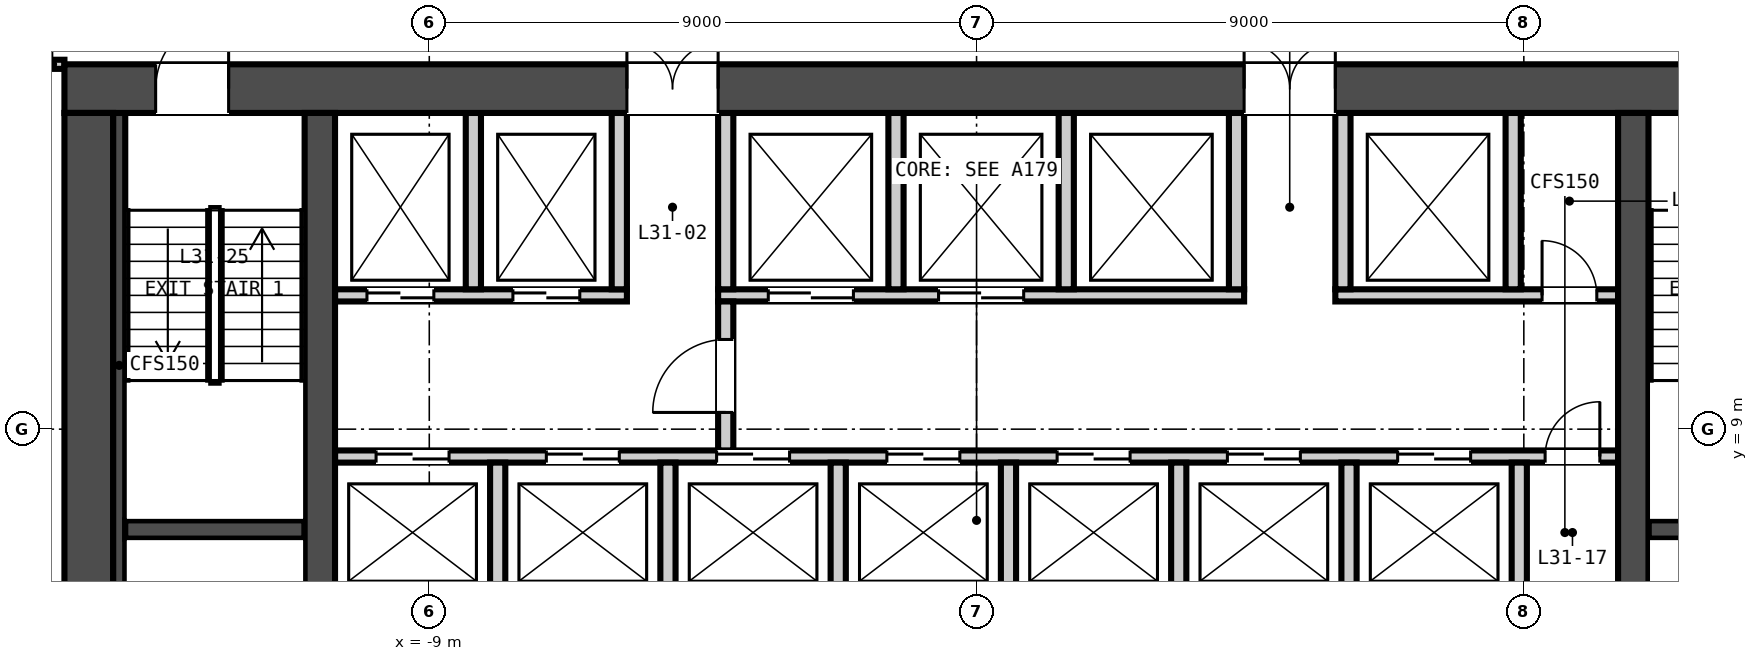
"""IFC4 building model, lengths in metres.
Left out: names, types, materials, properties, quantities, classifications, styles, units other than length and angle.
Written with IfcOpenShell. Run it as: python <this file> out.ifc"""

import sys

from ifc_helpers import new_model, si_unit, direction, frame, frame_2d, origin, place, context, subcontext, project, spatial, rectangle, extrude, element, fill, save


model = new_model("IFC4")
c1 = context("Model", 3, precision=1e-05, world=origin(), true_north=direction((0.0, 1.0)))
c2 = subcontext(c1, "Body", "Model", "MODEL_VIEW")
j1 = project(units=[si_unit("LENGTHUNIT", "METRE"), si_unit("PLANEANGLEUNIT", "RADIAN")], contexts=[c1])
p1 = place(None, origin())
s1 = spatial("IfcSite", under=j1, at=p1, CompositionType="ELEMENT")
p2 = place(p1, origin())
s2 = spatial("IfcBuilding", under=s1, at=p2, CompositionType="ELEMENT")
p3 = place(p2, frame((0.0, 0.0, 129.8)))
s3 = spatial("IfcBuildingStorey", under=s2, at=p3, CompositionType="ELEMENT", Elevation=129.8)
p4 = place(p3, frame((-15.0, 14.6, -0.15), z_axis=(0.0, 0.0, 1.0), x_axis=(1.0, 0.0, 0.0)))
e1 = element("IfcWall", 1, at=p4, inside=s3, PredefinedType="SOLIDWALL", context=c2, shape_type="SweptSolid", body=[
    extrude(rectangle(XDim=30.0, YDim=0.8, at=frame_2d((15.0, 0.0))), origin(), (0.0, 0.0, 1.0), 3.65),
])
p5 = place(p4, frame((9.25, 0.0, 0.15)))
e2 = element("IfcOpeningElement", 2, at=p5, cuts=e1, PredefinedType="OPENING", context=c2, shape_type="SweptSolid", body=[
    extrude(rectangle(XDim=1.5, YDim=2.1, at=frame_2d((0.75, 1.05))), frame((0.0, 0.41, 0.0), z_axis=(0.0, -1.0, 0.0), x_axis=(1.0, 0.0, 0.0)), (0.0, 0.0, 1.0), 0.82),
])
p6 = place(p4, frame((19.4, 0.0, 0.15)))
e3 = element("IfcOpeningElement", 3, at=p6, cuts=e1, PredefinedType="OPENING", context=c2, shape_type="SweptSolid", body=[
    extrude(rectangle(XDim=1.5, YDim=2.1, at=frame_2d((0.75, 1.05))), frame((0.0, 0.41, 0.0), z_axis=(0.0, -1.0, 0.0), x_axis=(1.0, 0.0, 0.0)), (0.0, 0.0, 1.0), 0.82),
])
p7 = place(p4, frame((1.5, 0.0, 0.15)))
e4 = element("IfcOpeningElement", 4, at=p7, cuts=e1, PredefinedType="OPENING", context=c2, shape_type="SweptSolid", body=[
    extrude(rectangle(XDim=1.2, YDim=2.1, at=frame_2d((0.6, 1.05))), frame((0.0, 0.41, 0.0), z_axis=(0.0, -1.0, 0.0), x_axis=(1.0, 0.0, 0.0)), (0.0, 0.0, 1.0), 0.82),
])
p8 = place(p4, frame((27.3, 0.0, 0.15)))
e5 = element("IfcOpeningElement", 5, at=p8, cuts=e1, PredefinedType="OPENING", context=c2, shape_type="SweptSolid", body=[
    extrude(rectangle(XDim=1.2, YDim=2.1, at=frame_2d((0.6, 1.05))), frame((0.0, 0.41, 0.0), z_axis=(0.0, -1.0, 0.0), x_axis=(1.0, 0.0, 0.0)), (0.0, 0.0, 1.0), 0.82),
])
p9 = place(p3, frame((-14.6, 0.8, -0.15), z_axis=(0.0, 0.0, 1.0), x_axis=(0.0, 1.0, 0.0)))
e6 = element("IfcWall", 6, at=p9, inside=s3, PredefinedType="SOLIDWALL", context=c2, shape_type="SweptSolid", body=[
    extrude(rectangle(XDim=13.4, YDim=0.8, at=frame_2d((6.7, 0.0))), origin(), (0.0, 0.0, 1.0), 3.65),
])
for number, where, z_axis, x_axis in (
    (7, (-10.8, 0.8, -0.15), (0.0, 0.0, 1.0), (0.0, 1.0, 0.0)),
    (8, (10.8, 0.8, -0.15), (0.0, 0.0, 1.0), (0.0, 1.0, 0.0)),
):
    element("IfcWall", number, at=place(p3, frame(where, z_axis=z_axis, x_axis=x_axis)), inside=s3, PredefinedType="SOLIDWALL", context=c2, shape_type="SweptSolid", body=[
        extrude(rectangle(XDim=13.4, YDim=0.5, at=frame_2d((6.7, 0.0))), origin(), (0.0, 0.0, 1.0), 3.65),
    ])
p10 = place(p3, frame((-10.55, 8.55, 0.0), z_axis=(0.0, 0.0, 1.0), x_axis=(1.0, 0.0, 0.0)))
e9 = element("IfcWall", 9, at=p10, inside=s3, PredefinedType="PARTITIONING", context=c2, shape_type="SweptSolid", body=[
    extrude(rectangle(XDim=21.1, YDim=0.2, at=frame_2d((10.55, 0.0))), origin(), (0.0, 0.0, 1.0), 3.5),
])
p11 = place(p10, frame((0.675, 0.0, 0.0)))
e10 = element("IfcOpeningElement", 10, at=p11, cuts=e9, PredefinedType="OPENING", context=c2, shape_type="SweptSolid", body=[
    extrude(rectangle(XDim=1.2, YDim=2.1, at=frame_2d((0.6, 1.05))), frame((0.0, 0.11, 0.0), z_axis=(0.0, -1.0, 0.0), x_axis=(1.0, 0.0, 0.0)), (0.0, 0.0, 1.0), 0.22),
])
p12 = place(p10, frame((3.475, 0.0, 0.0)))
e11 = element("IfcOpeningElement", 11, at=p12, cuts=e9, PredefinedType="OPENING", context=c2, shape_type="SweptSolid", body=[
    extrude(rectangle(XDim=1.2, YDim=2.1, at=frame_2d((0.6, 1.05))), frame((0.0, 0.11, 0.0), z_axis=(0.0, -1.0, 0.0), x_axis=(1.0, 0.0, 0.0)), (0.0, 0.0, 1.0), 0.22),
])
p13 = place(p10, frame((6.275, 0.0, 0.0)))
e12 = element("IfcOpeningElement", 12, at=p13, cuts=e9, PredefinedType="OPENING", context=c2, shape_type="SweptSolid", body=[
    extrude(rectangle(XDim=1.2, YDim=2.1, at=frame_2d((0.6, 1.05))), frame((0.0, 0.11, 0.0), z_axis=(0.0, -1.0, 0.0), x_axis=(1.0, 0.0, 0.0)), (0.0, 0.0, 1.0), 0.22),
])
p14 = place(p10, frame((9.075, 0.0, 0.0)))
e13 = element("IfcOpeningElement", 13, at=p14, cuts=e9, PredefinedType="OPENING", context=c2, shape_type="SweptSolid", body=[
    extrude(rectangle(XDim=1.2, YDim=2.1, at=frame_2d((0.6, 1.05))), frame((0.0, 0.11, 0.0), z_axis=(0.0, -1.0, 0.0), x_axis=(1.0, 0.0, 0.0)), (0.0, 0.0, 1.0), 0.22),
])
p15 = place(p10, frame((11.875, 0.0, 0.0)))
e14 = element("IfcOpeningElement", 14, at=p15, cuts=e9, PredefinedType="OPENING", context=c2, shape_type="SweptSolid", body=[
    extrude(rectangle(XDim=1.2, YDim=2.1, at=frame_2d((0.6, 1.05))), frame((0.0, 0.11, 0.0), z_axis=(0.0, -1.0, 0.0), x_axis=(1.0, 0.0, 0.0)), (0.0, 0.0, 1.0), 0.22),
])
p16 = place(p10, frame((14.675, 0.0, 0.0)))
e15 = element("IfcOpeningElement", 15, at=p16, cuts=e9, PredefinedType="OPENING", context=c2, shape_type="SweptSolid", body=[
    extrude(rectangle(XDim=1.2, YDim=2.1, at=frame_2d((0.6, 1.05))), frame((0.0, 0.11, 0.0), z_axis=(0.0, -1.0, 0.0), x_axis=(1.0, 0.0, 0.0)), (0.0, 0.0, 1.0), 0.22),
])
p17 = place(p10, frame((17.475, 0.0, 0.0)))
e16 = element("IfcOpeningElement", 16, at=p17, cuts=e9, PredefinedType="OPENING", context=c2, shape_type="SweptSolid", body=[
    extrude(rectangle(XDim=1.2, YDim=2.1, at=frame_2d((0.6, 1.05))), frame((0.0, 0.11, 0.0), z_axis=(0.0, -1.0, 0.0), x_axis=(1.0, 0.0, 0.0)), (0.0, 0.0, 1.0), 0.22),
])
p18 = place(p10, frame((19.9, 0.0, 0.0)))
e17 = element("IfcOpeningElement", 17, at=p18, cuts=e9, PredefinedType="OPENING", context=c2, shape_type="SweptSolid", body=[
    extrude(rectangle(XDim=0.9, YDim=2.1, at=frame_2d((0.45, 1.05))), frame((0.0, 0.11, 0.0), z_axis=(0.0, -1.0, 0.0), x_axis=(1.0, 0.0, 0.0)), (0.0, 0.0, 1.0), 0.22),
])
p19 = place(p3, frame((-10.55, 11.2, 0.0), z_axis=(0.0, 0.0, 1.0), x_axis=(1.0, 0.0, 0.0)))
e18 = element("IfcWall", 18, at=p19, inside=s3, PredefinedType="PARTITIONING", context=c2, shape_type="SweptSolid", body=[
    extrude(rectangle(XDim=4.8, YDim=0.2, at=frame_2d((2.4, 0.0))), origin(), (0.0, 0.0, 1.0), 3.5),
])
p20 = place(p19, frame((0.525, 0.0, 0.0)))
e19 = element("IfcOpeningElement", 19, at=p20, cuts=e18, PredefinedType="OPENING", context=c2, shape_type="SweptSolid", body=[
    extrude(rectangle(XDim=1.1, YDim=2.1, at=frame_2d((0.55, 1.05))), frame((0.0, 0.11, 0.0), z_axis=(0.0, -1.0, 0.0), x_axis=(1.0, 0.0, 0.0)), (0.0, 0.0, 1.0), 0.22),
])
p21 = place(p19, frame((2.925, 0.0, 0.0)))
e20 = element("IfcOpeningElement", 20, at=p21, cuts=e18, PredefinedType="OPENING", context=c2, shape_type="SweptSolid", body=[
    extrude(rectangle(XDim=1.1, YDim=2.1, at=frame_2d((0.55, 1.05))), frame((0.0, 0.11, 0.0), z_axis=(0.0, -1.0, 0.0), x_axis=(1.0, 0.0, 0.0)), (0.0, 0.0, 1.0), 0.22),
])
p22 = place(p3, frame((-4.25, 11.2, 0.0), z_axis=(0.0, 0.0, 1.0), x_axis=(1.0, 0.0, 0.0)))
e21 = element("IfcWall", 21, at=p22, inside=s3, PredefinedType="PARTITIONING", context=c2, shape_type="SweptSolid", body=[
    extrude(rectangle(XDim=8.65, YDim=0.2, at=frame_2d((4.325, 0.0))), origin(), (0.0, 0.0, 1.0), 3.5),
])
p23 = place(p22, frame((0.825, 0.0, 0.0)))
e22 = element("IfcOpeningElement", 22, at=p23, cuts=e21, PredefinedType="OPENING", context=c2, shape_type="SweptSolid", body=[
    extrude(rectangle(XDim=1.4, YDim=2.1, at=frame_2d((0.7, 1.05))), frame((0.0, 0.11, 0.0), z_axis=(0.0, -1.0, 0.0), x_axis=(1.0, 0.0, 0.0)), (0.0, 0.0, 1.0), 0.22),
])
p24 = place(p22, frame((3.625, 0.0, 0.0)))
e23 = element("IfcOpeningElement", 23, at=p24, cuts=e21, PredefinedType="OPENING", context=c2, shape_type="SweptSolid", body=[
    extrude(rectangle(XDim=1.4, YDim=2.1, at=frame_2d((0.7, 1.05))), frame((0.0, 0.11, 0.0), z_axis=(0.0, -1.0, 0.0), x_axis=(1.0, 0.0, 0.0)), (0.0, 0.0, 1.0), 0.22),
])
p25 = place(p3, frame((5.9, 11.2, 0.0), z_axis=(0.0, 0.0, 1.0), x_axis=(1.0, 0.0, 0.0)))
e24 = element("IfcWall", 24, at=p25, inside=s3, PredefinedType="PARTITIONING", context=c2, shape_type="SweptSolid", body=[
    extrude(rectangle(XDim=4.65, YDim=0.2, at=frame_2d((2.325, 0.0))), origin(), (0.0, 0.0, 1.0), 3.5),
])
p26 = place(p25, frame((3.4, 0.0, 0.0)))
e25 = element("IfcOpeningElement", 25, at=p26, cuts=e24, PredefinedType="OPENING", context=c2, shape_type="SweptSolid", body=[
    extrude(rectangle(XDim=0.9, YDim=2.1, at=frame_2d((0.45, 1.05))), frame((0.0, 0.11, 0.0), z_axis=(0.0, -1.0, 0.0), x_axis=(1.0, 0.0, 0.0)), (0.0, 0.0, 1.0), 0.22),
])
p27 = place(p3, frame((-4.125, 8.65, 0.0), z_axis=(0.0, 0.0, 1.0), x_axis=(0.0, 1.0, 0.0)))
e26 = element("IfcWall", 26, at=p27, inside=s3, PredefinedType="PARTITIONING", context=c2, shape_type="SweptSolid", body=[
    extrude(rectangle(XDim=2.45, YDim=0.25, at=frame_2d((1.225, 0.0))), origin(), (0.0, 0.0, 1.0), 3.5),
])
p28 = place(p27, frame((0.625, 0.0, 0.0)))
e27 = element("IfcOpeningElement", 27, at=p28, cuts=e26, PredefinedType="OPENING", context=c2, shape_type="SweptSolid", body=[
    extrude(rectangle(XDim=1.2, YDim=2.1, at=frame_2d((0.6, 1.05))), frame((0.0, 0.135, 0.0), z_axis=(0.0, -1.0, 0.0), x_axis=(1.0, 0.0, 0.0)), (0.0, 0.0, 1.0), 0.27),
])
for number, where, z_axis, x_axis in (
    (28, (-7.875, 6.15, 0.0), (0.0, 0.0, 1.0), (0.0, 1.0, 0.0)),
    (29, (-5.075, 6.15, 0.0), (0.0, 0.0, 1.0), (0.0, 1.0, 0.0)),
    (30, (-2.275, 6.15, 0.0), (0.0, 0.0, 1.0), (0.0, 1.0, 0.0)),
    (31, (0.525, 6.15, 0.0), (0.0, 0.0, 1.0), (0.0, 1.0, 0.0)),
    (32, (3.325, 6.15, 0.0), (0.0, 0.0, 1.0), (0.0, 1.0, 0.0)),
    (33, (6.125, 6.15, 0.0), (0.0, 0.0, 1.0), (0.0, 1.0, 0.0)),
    (34, (8.925, 6.15, 0.0), (0.0, 0.0, 1.0), (0.0, 1.0, 0.0)),
):
    element("IfcWall", number, at=place(p3, frame(where, z_axis=z_axis, x_axis=x_axis)), inside=s3, PredefinedType="PARTITIONING", context=c2, shape_type="SweptSolid", body=[
        extrude(rectangle(XDim=2.3, YDim=0.25, at=frame_2d((1.15, 0.0))), origin(), (0.0, 0.0, 1.0), 3.5),
    ])
for number, where, z_axis, x_axis in (
    (35, (-8.275, 11.3, 0.0), (0.0, 0.0, 1.0), (0.0, 1.0, 0.0)),
    (36, (-5.875, 11.3, 0.0), (0.0, 0.0, 1.0), (0.0, 1.0, 0.0)),
    (37, (-4.125, 11.3, 0.0), (0.0, 0.0, 1.0), (0.0, 1.0, 0.0)),
    (38, (-1.325, 11.3, 0.0), (0.0, 0.0, 1.0), (0.0, 1.0, 0.0)),
    (39, (1.475, 11.3, 0.0), (0.0, 0.0, 1.0), (0.0, 1.0, 0.0)),
    (40, (4.275, 11.3, 0.0), (0.0, 0.0, 1.0), (0.0, 1.0, 0.0)),
    (41, (6.025, 11.3, 0.0), (0.0, 0.0, 1.0), (0.0, 1.0, 0.0)),
    (42, (8.825, 11.3, 0.0), (0.0, 0.0, 1.0), (0.0, 1.0, 0.0)),
):
    element("IfcWall", number, at=place(p3, frame(where, z_axis=z_axis, x_axis=x_axis)), inside=s3, PredefinedType="PARTITIONING", context=c2, shape_type="SweptSolid", body=[
        extrude(rectangle(XDim=2.9, YDim=0.25, at=frame_2d((1.45, 0.0))), origin(), (0.0, 0.0, 1.0), 3.5),
    ])
p29 = place(p3, frame((-14.0, 7.35, 0.0), z_axis=(0.0, 0.0, 1.0), x_axis=(1.0, 0.0, 0.0)))
e43 = element("IfcWall", 43, at=p29, inside=s3, PredefinedType="SOLIDWALL", context=c2, shape_type="SweptSolid", body=[
    extrude(rectangle(XDim=2.95, YDim=0.3, at=frame_2d((1.475, 0.0))), origin(), (0.0, 0.0, 1.0), 3.5),
])
p30 = place(p3, frame((-14.1, 0.8, 0.0), z_axis=(0.0, 0.0, 1.0), x_axis=(0.0, 1.0, 0.0)))
e44 = element("IfcWall", 44, at=p30, inside=s3, PredefinedType="SOLIDWALL", context=c2, shape_type="SweptSolid", body=[
    extrude(rectangle(XDim=13.4, YDim=0.2, at=frame_2d((6.7, 0.0))), origin(), (0.0, 0.0, 1.0), 3.5),
])
p31 = place(p3, frame((11.05, 7.35, 0.0), z_axis=(0.0, 0.0, 1.0), x_axis=(1.0, 0.0, 0.0)))
e45 = element("IfcWall", 45, at=p31, inside=s3, PredefinedType="SOLIDWALL", context=c2, shape_type="SweptSolid", body=[
    extrude(rectangle(XDim=2.95, YDim=0.3, at=frame_2d((1.475, 0.0))), origin(), (0.0, 0.0, 1.0), 3.5),
])
p32 = place(p3, frame((-15.0, 15.0, 0.0), z_axis=(0.0, 0.0, 1.0), x_axis=(-1.0, 0.0, 0.0)))
e46 = element("IfcWall", 46, at=p32, inside=s3, PredefinedType="PARTITIONING", context=c2, shape_type="SweptSolid", body=[
    extrude(rectangle(XDim=0.401, YDim=0.15, at=frame_2d((0.2, 0.0))), origin(), (0.0, 0.0, 1.0), 2.741),
])
p33 = place(p28, origin())
e47 = element("IfcDoor", 47, at=p33, inside=s3, OperationType="SINGLE_SWING_LEFT", PredefinedType="DOOR", context=c2, shape_type="SweptSolid", body=[
    extrude(rectangle(XDim=1.2, YDim=2.1, at=frame_2d((0.6, 1.05))), frame((0.0, 0.025, 0.0), z_axis=(0.0, -1.0, 0.0), x_axis=(1.0, 0.0, 0.0)), (0.0, 0.0, 1.0), 0.05),
])
fill(e27, e47)
p34 = place(p11, origin())
e48 = element("IfcDoor", 48, at=p34, inside=s3, OperationType="DOUBLE_DOOR_SLIDING", PredefinedType="DOOR", context=c2, shape_type="SweptSolid", body=[
    extrude(rectangle(XDim=1.2, YDim=2.1, at=frame_2d((0.6, 1.05))), frame((0.0, 0.025, 0.0), z_axis=(0.0, -1.0, 0.0), x_axis=(1.0, 0.0, 0.0)), (0.0, 0.0, 1.0), 0.05),
])
fill(e10, e48)
p35 = place(p12, origin())
e49 = element("IfcDoor", 49, at=p35, inside=s3, OperationType="DOUBLE_DOOR_SLIDING", PredefinedType="DOOR", context=c2, shape_type="SweptSolid", body=[
    extrude(rectangle(XDim=1.2, YDim=2.1, at=frame_2d((0.6, 1.05))), frame((0.0, 0.025, 0.0), z_axis=(0.0, -1.0, 0.0), x_axis=(1.0, 0.0, 0.0)), (0.0, 0.0, 1.0), 0.05),
])
fill(e11, e49)
p36 = place(p13, origin())
e50 = element("IfcDoor", 50, at=p36, inside=s3, OperationType="DOUBLE_DOOR_SLIDING", PredefinedType="DOOR", context=c2, shape_type="SweptSolid", body=[
    extrude(rectangle(XDim=1.2, YDim=2.1, at=frame_2d((0.6, 1.05))), frame((0.0, 0.025, 0.0), z_axis=(0.0, -1.0, 0.0), x_axis=(1.0, 0.0, 0.0)), (0.0, 0.0, 1.0), 0.05),
])
fill(e12, e50)
p37 = place(p14, origin())
e51 = element("IfcDoor", 51, at=p37, inside=s3, OperationType="DOUBLE_DOOR_SLIDING", PredefinedType="DOOR", context=c2, shape_type="SweptSolid", body=[
    extrude(rectangle(XDim=1.2, YDim=2.1, at=frame_2d((0.6, 1.05))), frame((0.0, 0.025, 0.0), z_axis=(0.0, -1.0, 0.0), x_axis=(1.0, 0.0, 0.0)), (0.0, 0.0, 1.0), 0.05),
])
fill(e13, e51)
p38 = place(p15, origin())
e52 = element("IfcDoor", 52, at=p38, inside=s3, OperationType="DOUBLE_DOOR_SLIDING", PredefinedType="DOOR", context=c2, shape_type="SweptSolid", body=[
    extrude(rectangle(XDim=1.2, YDim=2.1, at=frame_2d((0.6, 1.05))), frame((0.0, 0.025, 0.0), z_axis=(0.0, -1.0, 0.0), x_axis=(1.0, 0.0, 0.0)), (0.0, 0.0, 1.0), 0.05),
])
fill(e14, e52)
p39 = place(p16, origin())
e53 = element("IfcDoor", 53, at=p39, inside=s3, OperationType="DOUBLE_DOOR_SLIDING", PredefinedType="DOOR", context=c2, shape_type="SweptSolid", body=[
    extrude(rectangle(XDim=1.2, YDim=2.1, at=frame_2d((0.6, 1.05))), frame((0.0, 0.025, 0.0), z_axis=(0.0, -1.0, 0.0), x_axis=(1.0, 0.0, 0.0)), (0.0, 0.0, 1.0), 0.05),
])
fill(e15, e53)
p40 = place(p17, origin())
e54 = element("IfcDoor", 54, at=p40, inside=s3, OperationType="DOUBLE_DOOR_SLIDING", PredefinedType="DOOR", context=c2, shape_type="SweptSolid", body=[
    extrude(rectangle(XDim=1.2, YDim=2.1, at=frame_2d((0.6, 1.05))), frame((0.0, 0.025, 0.0), z_axis=(0.0, -1.0, 0.0), x_axis=(1.0, 0.0, 0.0)), (0.0, 0.0, 1.0), 0.05),
])
fill(e16, e54)
p41 = place(p18, origin())
e55 = element("IfcDoor", 55, at=p41, inside=s3, OperationType="SINGLE_SWING_RIGHT", PredefinedType="DOOR", context=c2, shape_type="SweptSolid", body=[
    extrude(rectangle(XDim=0.9, YDim=2.1, at=frame_2d((0.45, 1.05))), frame((0.0, 0.025, 0.0), z_axis=(0.0, -1.0, 0.0), x_axis=(1.0, 0.0, 0.0)), (0.0, 0.0, 1.0), 0.05),
])
fill(e17, e55)
p42 = place(p20, origin())
e56 = element("IfcDoor", 56, at=p42, inside=s3, OperationType="DOUBLE_DOOR_SLIDING", PredefinedType="DOOR", context=c2, shape_type="SweptSolid", body=[
    extrude(rectangle(XDim=1.1, YDim=2.1, at=frame_2d((0.55, 1.05))), frame((0.0, 0.025, 0.0), z_axis=(0.0, -1.0, 0.0), x_axis=(1.0, 0.0, 0.0)), (0.0, 0.0, 1.0), 0.05),
])
fill(e19, e56)
p43 = place(p21, origin())
e57 = element("IfcDoor", 57, at=p43, inside=s3, OperationType="DOUBLE_DOOR_SLIDING", PredefinedType="DOOR", context=c2, shape_type="SweptSolid", body=[
    extrude(rectangle(XDim=1.1, YDim=2.1, at=frame_2d((0.55, 1.05))), frame((0.0, 0.025, 0.0), z_axis=(0.0, -1.0, 0.0), x_axis=(1.0, 0.0, 0.0)), (0.0, 0.0, 1.0), 0.05),
])
fill(e20, e57)
p44 = place(p23, origin())
e58 = element("IfcDoor", 58, at=p44, inside=s3, OperationType="DOUBLE_DOOR_SLIDING", PredefinedType="DOOR", context=c2, shape_type="SweptSolid", body=[
    extrude(rectangle(XDim=1.4, YDim=2.1, at=frame_2d((0.7, 1.05))), frame((0.0, 0.025, 0.0), z_axis=(0.0, -1.0, 0.0), x_axis=(1.0, 0.0, 0.0)), (0.0, 0.0, 1.0), 0.05),
])
fill(e22, e58)
p45 = place(p24, origin())
e59 = element("IfcDoor", 59, at=p45, inside=s3, OperationType="DOUBLE_DOOR_SLIDING", PredefinedType="DOOR", context=c2, shape_type="SweptSolid", body=[
    extrude(rectangle(XDim=1.4, YDim=2.1, at=frame_2d((0.7, 1.05))), frame((0.0, 0.025, 0.0), z_axis=(0.0, -1.0, 0.0), x_axis=(1.0, 0.0, 0.0)), (0.0, 0.0, 1.0), 0.05),
])
fill(e23, e59)
p46 = place(p26, origin())
e60 = element("IfcDoor", 60, at=p46, inside=s3, OperationType="SINGLE_SWING_LEFT", PredefinedType="DOOR", context=c2, shape_type="SweptSolid", body=[
    extrude(rectangle(XDim=0.9, YDim=2.1, at=frame_2d((0.45, 1.05))), frame((0.0, 0.025, 0.0), z_axis=(0.0, -1.0, 0.0), x_axis=(1.0, 0.0, 0.0)), (0.0, 0.0, 1.0), 0.05),
])
fill(e25, e60)
p47 = place(p5, origin())
e61 = element("IfcDoor", 61, at=p47, inside=s3, OperationType="DOUBLE_DOOR_SINGLE_SWING", PredefinedType="DOOR", context=c2, shape_type="SweptSolid", body=[
    extrude(rectangle(XDim=1.5, YDim=2.1, at=frame_2d((0.75, 1.05))), frame((0.0, 0.025, 0.0), z_axis=(0.0, -1.0, 0.0), x_axis=(1.0, 0.0, 0.0)), (0.0, 0.0, 1.0), 0.05),
])
fill(e2, e61)
p48 = place(p6, origin())
e62 = element("IfcDoor", 62, at=p48, inside=s3, OperationType="DOUBLE_DOOR_SINGLE_SWING", PredefinedType="DOOR", context=c2, shape_type="SweptSolid", body=[
    extrude(rectangle(XDim=1.5, YDim=2.1, at=frame_2d((0.75, 1.05))), frame((0.0, 0.025, 0.0), z_axis=(0.0, -1.0, 0.0), x_axis=(1.0, 0.0, 0.0)), (0.0, 0.0, 1.0), 0.05),
])
fill(e3, e62)
p49 = place(p7, origin())
e63 = element("IfcDoor", 63, at=p49, inside=s3, OperationType="SINGLE_SWING_RIGHT", PredefinedType="DOOR", context=c2, shape_type="SweptSolid", body=[
    extrude(rectangle(XDim=1.2, YDim=2.1, at=frame_2d((0.6, 1.05))), frame((0.0, 0.025, 0.0), z_axis=(0.0, -1.0, 0.0), x_axis=(1.0, 0.0, 0.0)), (0.0, 0.0, 1.0), 0.05),
])
fill(e4, e63)
save(model, sys.argv[1])
